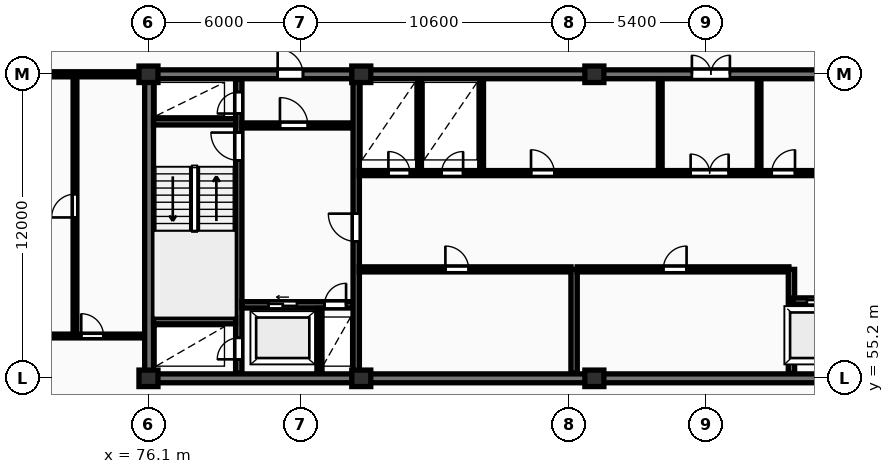
"""IFC4 building model, lengths in metres.
Left out: names, types, materials, properties, quantities, classifications, styles, units other than length and angle.
Written with IfcOpenShell. Run it as: python <this file> out.ifc"""

import sys

from ifc_helpers import new_model, si_unit, direction, frame, frame_2d, origin, origin_2d, place, context, subcontext, project, spatial, rectangle, extrude, element, fill, save


model = new_model("IFC4")
c1 = context("Model", 3, precision=1e-05, world=origin(), true_north=direction((0.0, 1.0)))
c2 = subcontext(c1, "Body", "Model", "MODEL_VIEW")
j1 = project(units=[si_unit("LENGTHUNIT", "METRE"), si_unit("PLANEANGLEUNIT", "RADIAN")], contexts=[c1])
p1 = place(None, origin())
s1 = spatial("IfcSite", under=j1, at=p1, CompositionType="ELEMENT")
p2 = place(p1, origin())
s2 = spatial("IfcBuilding", under=s1, at=p2, CompositionType="ELEMENT")
p3 = place(p2, frame((0.0, 0.0, 249.35)))
s3 = spatial("IfcBuildingStorey", under=s2, at=p3, CompositionType="ELEMENT", Elevation=249.35)
for number, where, z_axis, x_axis in (
    (1, (76.1, 55.2, 0.0), (0.0, 0.0, 1.0), (1.0, 0.0, 0.0)),
    (2, (76.1, 67.2, 0.0), (0.0, 0.0, 1.0), (1.0, 0.0, 0.0)),
    (3, (84.5, 55.2, 0.0), (0.0, 0.0, 1.0), (1.0, 0.0, 0.0)),
    (4, (84.5, 67.2, 0.0), (0.0, 0.0, 1.0), (1.0, 0.0, 0.0)),
    (5, (93.7, 55.2, 0.0), (0.0, 0.0, 1.0), (1.0, 0.0, 0.0)),
    (6, (93.7, 67.2, 0.0), (0.0, 0.0, 1.0), (1.0, 0.0, 0.0)),
):
    element("IfcColumn", number, at=place(p3, frame(where, z_axis=z_axis, x_axis=x_axis)), inside=s3, PredefinedType="COLUMN", context=c2, shape_type="SweptSolid", body=[
        extrude(rectangle(XDim=0.75, YDim=0.65, at=origin_2d()), origin(), (0.0, 0.0, 1.0), 3.45),
    ])
p4 = place(p3, frame((75.95, 55.2, 0.0), z_axis=(0.0, 0.0, 1.0), x_axis=(1.0, 0.0, 0.0)))
e7 = element("IfcWall", 7, at=p4, inside=s3, PredefinedType="SHEAR", context=c2, shape_type="SweptSolid", body=[
    extrude(rectangle(XDim=36.3, YDim=0.35, at=frame_2d((18.15, 0.0))), origin(), (0.0, 0.0, 1.0), 3.45),
])
p5 = place(p3, frame((76.125, 55.375, 0.0), z_axis=(0.0, 0.0, 1.0), x_axis=(0.0, 1.0, 0.0)))
e8 = element("IfcWall", 8, at=p5, inside=s3, PredefinedType="SHEAR", context=c2, shape_type="SweptSolid", body=[
    extrude(rectangle(XDim=11.65, YDim=0.35, at=frame_2d((5.825, 0.0))), origin(), (0.0, 0.0, 1.0), 3.45),
])
p6 = place(p3, frame((75.95, 67.2, 0.0), z_axis=(0.0, 0.0, 1.0), x_axis=(1.0, 0.0, 0.0)))
e9 = element("IfcWall", 9, at=p6, inside=s3, PredefinedType="SHEAR", context=c2, shape_type="SweptSolid", body=[
    extrude(rectangle(XDim=36.3, YDim=0.35, at=frame_2d((18.15, 0.0))), origin(), (0.0, 0.0, 1.0), 3.45),
])
p7 = place(p6, frame((5.25, 0.0, 0.0)))
e10 = element("IfcOpeningElement", 10, at=p7, cuts=e9, PredefinedType="OPENING", context=c2, shape_type="SweptSolid", body=[
    extrude(rectangle(XDim=1.0, YDim=2.15, at=frame_2d((0.5, 1.075))), frame((0.0, 0.185, 0.0), z_axis=(0.0, -1.0, 0.0), x_axis=(1.0, 0.0, 0.0)), (0.0, 0.0, 1.0), 0.37),
])
p8 = place(p6, frame((21.6, 0.0, 0.0)))
e11 = element("IfcOpeningElement", 11, at=p8, cuts=e9, PredefinedType="OPENING", context=c2, shape_type="SweptSolid", body=[
    extrude(rectangle(XDim=1.5, YDim=2.2, at=frame_2d((0.75, 1.1))), frame((0.0, 0.185, 0.0), z_axis=(0.0, -1.0, 0.0), x_axis=(1.0, 0.0, 0.0)), (0.0, 0.0, 1.0), 0.37),
])
p9 = place(p6, frame((30.45, 0.0, 0.0)))
e12 = element("IfcOpeningElement", 12, at=p9, cuts=e9, PredefinedType="OPENING", context=c2, shape_type="SweptSolid", body=[
    extrude(rectangle(XDim=1.0, YDim=2.15, at=frame_2d((0.5, 1.075))), frame((0.0, 0.185, 0.0), z_axis=(0.0, -1.0, 0.0), x_axis=(1.0, 0.0, 0.0)), (0.0, 0.0, 1.0), 0.37),
])
p10 = place(p3, frame((79.665, 55.4, 0.0), z_axis=(0.0, 0.0, 1.0), x_axis=(0.0, 1.0, 0.0)))
e13 = element("IfcWall", 13, at=p10, inside=s3, PredefinedType="SHEAR", context=c2, shape_type="SweptSolid", body=[
    extrude(rectangle(XDim=11.6, YDim=0.25, at=frame_2d((5.8, 0.0))), origin(), (0.0, 0.0, 1.0), 3.45),
])
p11 = place(p10, frame((0.55, 0.0, 0.0)))
e14 = element("IfcOpeningElement", 14, at=p11, cuts=e13, PredefinedType="OPENING", context=c2, shape_type="SweptSolid", body=[
    extrude(rectangle(XDim=0.85, YDim=2.05, at=frame_2d((0.425, 1.025))), frame((0.0, 0.135, 0.0), z_axis=(0.0, -1.0, 0.0), x_axis=(1.0, 0.0, 0.0)), (0.0, 0.0, 1.0), 0.27),
])
p12 = place(p10, frame((8.4, 0.0, 0.0)))
e15 = element("IfcOpeningElement", 15, at=p12, cuts=e13, PredefinedType="OPENING", context=c2, shape_type="SweptSolid", body=[
    extrude(rectangle(XDim=1.1, YDim=2.1, at=frame_2d((0.55, 1.05))), frame((0.0, 0.135, 0.0), z_axis=(0.0, -1.0, 0.0), x_axis=(1.0, 0.0, 0.0)), (0.0, 0.0, 1.0), 0.27),
])
p13 = place(p10, frame((10.25, 0.0, 0.0)))
e16 = element("IfcOpeningElement", 16, at=p13, cuts=e13, PredefinedType="OPENING", context=c2, shape_type="SweptSolid", body=[
    extrude(rectangle(XDim=0.85, YDim=2.05, at=frame_2d((0.425, 1.025))), frame((0.0, 0.135, 0.0), z_axis=(0.0, -1.0, 0.0), x_axis=(1.0, 0.0, 0.0)), (0.0, 0.0, 1.0), 0.27),
])
for number, where, z_axis, x_axis in (
    (17, (76.3, 57.475, 0.0), (0.0, 0.0, 1.0), (1.0, 0.0, 0.0)),
    (18, (76.3, 65.325, 0.0), (0.0, 0.0, 1.0), (1.0, 0.0, 0.0)),
):
    element("IfcWall", number, at=place(p3, frame(where, z_axis=z_axis, x_axis=x_axis)), inside=s3, PredefinedType="SHEAR", context=c2, shape_type="SweptSolid", body=[
        extrude(rectangle(XDim=3.24, YDim=0.25, at=frame_2d((1.62, 0.0))), origin(), (0.0, 0.0, 1.0), 3.45),
    ])
p14 = place(p3, frame((79.79, 58.1, 0.0), z_axis=(0.0, 0.0, 1.0), x_axis=(1.0, 0.0, 0.0)))
e19 = element("IfcWall", 19, at=p14, inside=s3, PredefinedType="SHEAR", context=c2, shape_type="SweptSolid", body=[
    extrude(rectangle(XDim=4.39, YDim=0.25, at=frame_2d((2.195, 0.0))), origin(), (0.0, 0.0, 1.0), 3.45),
])
p15 = place(p14, frame((1.05, 0.0, 0.0)))
e20 = element("IfcOpeningElement", 20, at=p15, cuts=e19, PredefinedType="OPENING", context=c2, shape_type="SweptSolid", body=[
    extrude(rectangle(XDim=1.12, YDim=2.12, at=frame_2d((0.56, 1.06))), frame((0.0, 0.135, 0.0), z_axis=(0.0, -1.0, 0.0), x_axis=(1.0, 0.0, 0.0)), (0.0, 0.0, 1.0), 0.27),
])
p16 = place(p14, frame((3.26, 0.0, 0.0)))
e21 = element("IfcOpeningElement", 21, at=p16, cuts=e19, PredefinedType="OPENING", context=c2, shape_type="SweptSolid", body=[
    extrude(rectangle(XDim=0.85, YDim=2.05, at=frame_2d((0.425, 1.025))), frame((0.0, 0.135, 0.0), z_axis=(0.0, -1.0, 0.0), x_axis=(1.0, 0.0, 0.0)), (0.0, 0.0, 1.0), 0.27),
])
p17 = place(p3, frame((82.85, 55.4, 0.0), z_axis=(0.0, 0.0, 1.0), x_axis=(0.0, 1.0, 0.0)))
e22 = element("IfcWall", 22, at=p17, inside=s3, PredefinedType="PARTITIONING", context=c2, shape_type="SweptSolid", body=[
    extrude(rectangle(XDim=2.56, YDim=0.2, at=frame_2d((1.28, 0.0))), origin(), (0.0, 0.0, 1.0), 3.17),
])
p18 = place(p3, frame((79.79, 65.18, 0.0), z_axis=(0.0, 0.0, 1.0), x_axis=(1.0, 0.0, 0.0)))
e23 = element("IfcWall", 23, at=p18, inside=s3, PredefinedType="PARTITIONING", context=c2, shape_type="SweptSolid", body=[
    extrude(rectangle(XDim=4.39, YDim=0.2, at=frame_2d((2.195, 0.0))), origin(), (0.0, 0.0, 1.0), 3.17),
])
p19 = place(p18, frame((1.5, 0.0, 0.0)))
e24 = element("IfcOpeningElement", 24, at=p19, cuts=e23, PredefinedType="OPENING", context=c2, shape_type="SweptSolid", body=[
    extrude(rectangle(XDim=1.1, YDim=2.1, at=frame_2d((0.55, 1.05))), frame((0.0, 0.11, 0.0), z_axis=(0.0, -1.0, 0.0), x_axis=(1.0, 0.0, 0.0)), (0.0, 0.0, 1.0), 0.22),
])
p20 = place(p3, frame((84.3, 55.4, 0.0), z_axis=(0.0, 0.0, 1.0), x_axis=(0.0, 1.0, 0.0)))
e25 = element("IfcWall", 25, at=p20, inside=s3, PredefinedType="SHEAR", context=c2, shape_type="SweptSolid", body=[
    extrude(rectangle(XDim=11.6, YDim=0.25, at=frame_2d((5.8, 0.0))), origin(), (0.0, 0.0, 1.0), 3.45),
])
p21 = place(p20, frame((5.2, 0.0, 0.0)))
e26 = element("IfcOpeningElement", 26, at=p21, cuts=e25, PredefinedType="OPENING", context=c2, shape_type="SweptSolid", body=[
    extrude(rectangle(XDim=1.1, YDim=2.1, at=frame_2d((0.55, 1.05))), frame((0.0, 0.135, 0.0), z_axis=(0.0, -1.0, 0.0), x_axis=(1.0, 0.0, 0.0)), (0.0, 0.0, 1.0), 0.27),
])
p22 = place(p3, frame((84.42, 59.5, 0.0), z_axis=(0.0, 0.0, 1.0), x_axis=(1.0, 0.0, 0.0)))
e27 = element("IfcWall", 27, at=p22, inside=s3, PredefinedType="PARTITIONING", context=c2, shape_type="SweptSolid", body=[
    extrude(rectangle(XDim=8.36, YDim=0.2, at=frame_2d((4.18, 0.0))), origin(), (0.0, 0.0, 1.0), 3.17),
])
p23 = place(p22, frame((3.4, 0.0, 0.0)))
e28 = element("IfcOpeningElement", 28, at=p23, cuts=e27, PredefinedType="OPENING", context=c2, shape_type="SweptSolid", body=[
    extrude(rectangle(XDim=0.92, YDim=2.08, at=frame_2d((0.46, 1.04))), frame((0.0, 0.11, 0.0), z_axis=(0.0, -1.0, 0.0), x_axis=(1.0, 0.0, 0.0)), (0.0, 0.0, 1.0), 0.22),
])
p24 = place(p3, frame((92.9, 55.4, 0.0), z_axis=(0.0, 0.0, 1.0), x_axis=(0.0, 1.0, 0.0)))
e29 = element("IfcWall", 29, at=p24, inside=s3, PredefinedType="SHEAR", context=c2, shape_type="SweptSolid", body=[
    extrude(rectangle(XDim=4.1, YDim=0.25, at=frame_2d((2.05, 0.0))), origin(), (0.0, 0.0, 1.0), 3.45),
])
p25 = place(p3, frame((93.02, 59.5, 0.0), z_axis=(0.0, 0.0, 1.0), x_axis=(1.0, 0.0, 0.0)))
e30 = element("IfcWall", 30, at=p25, inside=s3, PredefinedType="PARTITIONING", context=c2, shape_type="SweptSolid", body=[
    extrude(rectangle(XDim=8.36, YDim=0.2, at=frame_2d((4.18, 0.0))), origin(), (0.0, 0.0, 1.0), 3.17),
])
p26 = place(p25, frame((3.4, 0.0, 0.0)))
e31 = element("IfcOpeningElement", 31, at=p26, cuts=e30, PredefinedType="OPENING", context=c2, shape_type="SweptSolid", body=[
    extrude(rectangle(XDim=0.92, YDim=2.08, at=frame_2d((0.46, 1.04))), frame((0.0, 0.11, 0.0), z_axis=(0.0, -1.0, 0.0), x_axis=(1.0, 0.0, 0.0)), (0.0, 0.0, 1.0), 0.22),
])
p27 = place(p3, frame((101.48, 55.4, 0.0), z_axis=(0.0, 0.0, 1.0), x_axis=(0.0, 1.0, 0.0)))
e32 = element("IfcWall", 32, at=p27, inside=s3, PredefinedType="SHEAR", context=c2, shape_type="SweptSolid", body=[
    extrude(rectangle(XDim=4.1, YDim=0.25, at=frame_2d((2.05, 0.0))), origin(), (0.0, 0.0, 1.0), 3.45),
])
p28 = place(p3, frame((101.55, 58.25, 0.0), z_axis=(0.0, 0.0, 1.0), x_axis=(1.0, 0.0, 0.0)))
e33 = element("IfcWall", 33, at=p28, inside=s3, PredefinedType="SHEAR", context=c2, shape_type="SweptSolid", body=[
    extrude(rectangle(XDim=4.6, YDim=0.25, at=frame_2d((2.3, 0.0))), origin(), (0.0, 0.0, 1.0), 3.45),
])
p29 = place(p28, frame((0.54, 0.0, 0.0)))
e34 = element("IfcOpeningElement", 34, at=p29, cuts=e33, PredefinedType="OPENING", context=c2, shape_type="SweptSolid", body=[
    extrude(rectangle(XDim=1.12, YDim=2.12, at=frame_2d((0.56, 1.06))), frame((0.0, 0.135, 0.0), z_axis=(0.0, -1.0, 0.0), x_axis=(1.0, 0.0, 0.0)), (0.0, 0.0, 1.0), 0.27),
])
p30 = place(p28, frame((2.94, 0.0, 0.0)))
e35 = element("IfcOpeningElement", 35, at=p30, cuts=e33, PredefinedType="OPENING", context=c2, shape_type="SweptSolid", body=[
    extrude(rectangle(XDim=1.12, YDim=2.12, at=frame_2d((0.56, 1.06))), frame((0.0, 0.135, 0.0), z_axis=(0.0, -1.0, 0.0), x_axis=(1.0, 0.0, 0.0)), (0.0, 0.0, 1.0), 0.27),
])
for number, where, z_axis, x_axis in (
    (36, (86.8, 63.4, 0.0), (0.0, 0.0, 1.0), (0.0, 1.0, 0.0)),
    (37, (89.25, 63.4, 0.0), (0.0, 0.0, 1.0), (0.0, 1.0, 0.0)),
    (38, (96.3, 63.4, 0.0), (0.0, 0.0, 1.0), (0.0, 1.0, 0.0)),
    (39, (100.2, 63.4, 0.0), (0.0, 0.0, 1.0), (0.0, 1.0, 0.0)),
):
    element("IfcWall", number, at=place(p3, frame(where, z_axis=z_axis, x_axis=x_axis)), inside=s3, PredefinedType="PARTITIONING", context=c2, shape_type="SweptSolid", body=[
        extrude(rectangle(XDim=3.6, YDim=0.15, at=frame_2d((1.8, 0.0))), origin(), (0.0, 0.0, 1.0), 3.17),
    ])
p31 = place(p3, frame((84.42, 63.3, 0.0), z_axis=(0.0, 0.0, 1.0), x_axis=(1.0, 0.0, 0.0)))
e40 = element("IfcWall", 40, at=p31, inside=s3, PredefinedType="PARTITIONING", context=c2, shape_type="SweptSolid", body=[
    extrude(rectangle(XDim=19.83, YDim=0.2, at=frame_2d((9.915, 0.0))), origin(), (0.0, 0.0, 1.0), 3.17),
])
p32 = place(p31, frame((1.15, 0.0, 0.0)))
e41 = element("IfcOpeningElement", 41, at=p32, cuts=e40, PredefinedType="OPENING", context=c2, shape_type="SweptSolid", body=[
    extrude(rectangle(XDim=0.85, YDim=2.05, at=frame_2d((0.425, 1.025))), frame((0.0, 0.11, 0.0), z_axis=(0.0, -1.0, 0.0), x_axis=(1.0, 0.0, 0.0)), (0.0, 0.0, 1.0), 0.22),
])
p33 = place(p31, frame((3.25, 0.0, 0.0)))
e42 = element("IfcOpeningElement", 42, at=p33, cuts=e40, PredefinedType="OPENING", context=c2, shape_type="SweptSolid", body=[
    extrude(rectangle(XDim=0.85, YDim=2.05, at=frame_2d((0.425, 1.025))), frame((0.0, 0.11, 0.0), z_axis=(0.0, -1.0, 0.0), x_axis=(1.0, 0.0, 0.0)), (0.0, 0.0, 1.0), 0.22),
])
p34 = place(p31, frame((13.08, 0.0, 0.0)))
e43 = element("IfcOpeningElement", 43, at=p34, cuts=e40, PredefinedType="OPENING", context=c2, shape_type="SweptSolid", body=[
    extrude(rectangle(XDim=1.5, YDim=2.2, at=frame_2d((0.75, 1.1))), frame((0.0, 0.11, 0.0), z_axis=(0.0, -1.0, 0.0), x_axis=(1.0, 0.0, 0.0)), (0.0, 0.0, 1.0), 0.22),
])
p35 = place(p31, frame((6.78, 0.0, 0.0)))
e44 = element("IfcOpeningElement", 44, at=p35, cuts=e40, PredefinedType="OPENING", context=c2, shape_type="SweptSolid", body=[
    extrude(rectangle(XDim=0.92, YDim=2.08, at=frame_2d((0.46, 1.04))), frame((0.0, 0.11, 0.0), z_axis=(0.0, -1.0, 0.0), x_axis=(1.0, 0.0, 0.0)), (0.0, 0.0, 1.0), 0.22),
])
p36 = place(p31, frame((16.28, 0.0, 0.0)))
e45 = element("IfcOpeningElement", 45, at=p36, cuts=e40, PredefinedType="OPENING", context=c2, shape_type="SweptSolid", body=[
    extrude(rectangle(XDim=0.92, YDim=2.08, at=frame_2d((0.46, 1.04))), frame((0.0, 0.11, 0.0), z_axis=(0.0, -1.0, 0.0), x_axis=(1.0, 0.0, 0.0)), (0.0, 0.0, 1.0), 0.22),
])
p37 = place(p3, frame((73.2, 56.87, 0.0), z_axis=(0.0, 0.0, 1.0), x_axis=(0.0, 1.0, 0.0)))
e46 = element("IfcWall", 46, at=p37, inside=s3, PredefinedType="PARTITIONING", context=c2, shape_type="SweptSolid", body=[
    extrude(rectangle(XDim=10.28, YDim=0.15, at=frame_2d((5.14, 0.0))), origin(), (0.0, 0.0, 1.0), 3.17),
])
p38 = place(p37, frame((4.68, 0.0, 0.0)))
e47 = element("IfcOpeningElement", 47, at=p38, cuts=e46, PredefinedType="OPENING", context=c2, shape_type="SweptSolid", body=[
    extrude(rectangle(XDim=0.92, YDim=2.08, at=frame_2d((0.46, 1.04))), frame((0.0, 0.085, 0.0), z_axis=(0.0, -1.0, 0.0), x_axis=(1.0, 0.0, 0.0)), (0.0, 0.0, 1.0), 0.17),
])
p39 = place(p3, frame((69.17, 56.87, 0.0), z_axis=(0.0, 0.0, 1.0), x_axis=(1.0, 0.0, 0.0)))
e48 = element("IfcWall", 48, at=p39, inside=s3, PredefinedType="PARTITIONING", context=c2, shape_type="SweptSolid", body=[
    extrude(rectangle(XDim=6.76, YDim=0.15, at=frame_2d((3.38, 0.0))), origin(), (0.0, 0.0, 1.0), 3.17),
])
p40 = place(p39, frame((1.362, 0.0, 0.0)))
e49 = element("IfcOpeningElement", 49, at=p40, cuts=e48, PredefinedType="OPENING", context=c2, shape_type="SweptSolid", body=[
    extrude(rectangle(XDim=0.84, YDim=2.04, at=frame_2d((0.42, 1.02))), frame((0.0, 0.085, 0.0), z_axis=(0.0, -1.0, 0.0), x_axis=(1.0, 0.0, 0.0)), (0.0, 0.0, 1.0), 0.17),
])
p41 = place(p39, frame((4.277, 0.0, 0.0)))
e50 = element("IfcOpeningElement", 50, at=p41, cuts=e48, PredefinedType="OPENING", context=c2, shape_type="SweptSolid", body=[
    extrude(rectangle(XDim=0.88, YDim=2.06, at=frame_2d((0.44, 1.03))), frame((0.0, 0.085, 0.0), z_axis=(0.0, -1.0, 0.0), x_axis=(1.0, 0.0, 0.0)), (0.0, 0.0, 1.0), 0.17),
])
p42 = place(p3, frame((59.8, 67.2, 0.0), z_axis=(0.0, 0.0, 1.0), x_axis=(1.0, 0.0, 0.0)))
e51 = element("IfcWall", 51, at=p42, inside=s3, PredefinedType="PARTITIONING", context=c2, shape_type="SweptSolid", body=[
    extrude(rectangle(XDim=16.15, YDim=0.2, at=frame_2d((8.075, 0.0))), origin(), (0.0, 0.0, 1.0), 2.633),
])
p43 = place(p42, frame((9.772, 0.0, 0.0)))
e52 = element("IfcOpeningElement", 52, at=p43, cuts=e51, PredefinedType="OPENING", context=c2, shape_type="SweptSolid", body=[
    extrude(rectangle(XDim=0.95, YDim=2.15, at=frame_2d((0.475, 1.075))), frame((0.0, 0.11, 0.0), z_axis=(0.0, -1.0, 0.0), x_axis=(1.0, 0.0, 0.0)), (0.0, 0.0, 1.0), 0.22),
])
p44 = place(p7, origin())
e53 = element("IfcDoor", 53, at=p44, inside=s3, OperationType="SINGLE_SWING_LEFT", PredefinedType="DOOR", context=c2, shape_type="SweptSolid", body=[
    extrude(rectangle(XDim=1.0, YDim=2.15, at=frame_2d((0.5, 1.075))), frame((0.0, 0.025, 0.0), z_axis=(0.0, -1.0, 0.0), x_axis=(1.0, 0.0, 0.0)), (0.0, 0.0, 1.0), 0.05),
])
fill(e10, e53)
p45 = place(p8, origin())
e54 = element("IfcDoor", 54, at=p45, inside=s3, OperationType="DOUBLE_DOOR_SINGLE_SWING", PredefinedType="DOOR", context=c2, shape_type="SweptSolid", body=[
    extrude(rectangle(XDim=1.5, YDim=2.2, at=frame_2d((0.75, 1.1))), frame((0.0, 0.025, 0.0), z_axis=(0.0, -1.0, 0.0), x_axis=(1.0, 0.0, 0.0)), (0.0, 0.0, 1.0), 0.05),
])
fill(e11, e54)
p46 = place(p11, origin())
e55 = element("IfcDoor", 55, at=p46, inside=s3, OperationType="SINGLE_SWING_LEFT", PredefinedType="DOOR", context=c2, shape_type="SweptSolid", body=[
    extrude(rectangle(XDim=0.85, YDim=2.05, at=frame_2d((0.425, 1.025))), frame((0.0, 0.025, 0.0), z_axis=(0.0, -1.0, 0.0), x_axis=(1.0, 0.0, 0.0)), (0.0, 0.0, 1.0), 0.05),
])
fill(e14, e55)
p47 = place(p12, origin())
e56 = element("IfcDoor", 56, at=p47, inside=s3, OperationType="SINGLE_SWING_RIGHT", PredefinedType="DOOR", context=c2, shape_type="SweptSolid", body=[
    extrude(rectangle(XDim=1.1, YDim=2.1, at=frame_2d((0.55, 1.05))), frame((0.0, 0.025, 0.0), z_axis=(0.0, -1.0, 0.0), x_axis=(1.0, 0.0, 0.0)), (0.0, 0.0, 1.0), 0.05),
])
fill(e15, e56)
p48 = place(p13, origin())
e57 = element("IfcDoor", 57, at=p48, inside=s3, OperationType="SINGLE_SWING_LEFT", PredefinedType="DOOR", context=c2, shape_type="SweptSolid", body=[
    extrude(rectangle(XDim=0.85, YDim=2.05, at=frame_2d((0.425, 1.025))), frame((0.0, 0.025, 0.0), z_axis=(0.0, -1.0, 0.0), x_axis=(1.0, 0.0, 0.0)), (0.0, 0.0, 1.0), 0.05),
])
fill(e16, e57)
p49 = place(p15, origin())
e58 = element("IfcDoor", 58, at=p49, inside=s3, OperationType="SLIDING_TO_LEFT", PredefinedType="DOOR", context=c2, shape_type="SweptSolid", body=[
    extrude(rectangle(XDim=1.12, YDim=2.12, at=frame_2d((0.56, 1.06))), frame((0.0, 0.025, 0.0), z_axis=(0.0, -1.0, 0.0), x_axis=(1.0, 0.0, 0.0)), (0.0, 0.0, 1.0), 0.05),
])
fill(e20, e58)
p50 = place(p16, origin())
e59 = element("IfcDoor", 59, at=p50, inside=s3, OperationType="SINGLE_SWING_RIGHT", PredefinedType="DOOR", context=c2, shape_type="SweptSolid", body=[
    extrude(rectangle(XDim=0.85, YDim=2.05, at=frame_2d((0.425, 1.025))), frame((0.0, 0.025, 0.0), z_axis=(0.0, -1.0, 0.0), x_axis=(1.0, 0.0, 0.0)), (0.0, 0.0, 1.0), 0.05),
])
fill(e21, e59)
p51 = place(p19, origin())
e60 = element("IfcDoor", 60, at=p51, inside=s3, OperationType="SINGLE_SWING_LEFT", PredefinedType="DOOR", context=c2, shape_type="SweptSolid", body=[
    extrude(rectangle(XDim=1.1, YDim=2.1, at=frame_2d((0.55, 1.05))), frame((0.0, 0.025, 0.0), z_axis=(0.0, -1.0, 0.0), x_axis=(1.0, 0.0, 0.0)), (0.0, 0.0, 1.0), 0.05),
])
fill(e24, e60)
p52 = place(p21, origin())
e61 = element("IfcDoor", 61, at=p52, inside=s3, OperationType="SINGLE_SWING_RIGHT", PredefinedType="DOOR", context=c2, shape_type="SweptSolid", body=[
    extrude(rectangle(XDim=1.1, YDim=2.1, at=frame_2d((0.55, 1.05))), frame((0.0, 0.025, 0.0), z_axis=(0.0, -1.0, 0.0), x_axis=(1.0, 0.0, 0.0)), (0.0, 0.0, 1.0), 0.05),
])
fill(e26, e61)
p53 = place(p23, origin())
e62 = element("IfcDoor", 62, at=p53, inside=s3, OperationType="SINGLE_SWING_LEFT", PredefinedType="DOOR", context=c2, shape_type="SweptSolid", body=[
    extrude(rectangle(XDim=0.92, YDim=2.08, at=frame_2d((0.46, 1.04))), frame((0.0, 0.025, 0.0), z_axis=(0.0, -1.0, 0.0), x_axis=(1.0, 0.0, 0.0)), (0.0, 0.0, 1.0), 0.05),
])
fill(e28, e62)
p54 = place(p26, origin())
e63 = element("IfcDoor", 63, at=p54, inside=s3, OperationType="SINGLE_SWING_RIGHT", PredefinedType="DOOR", context=c2, shape_type="SweptSolid", body=[
    extrude(rectangle(XDim=0.92, YDim=2.08, at=frame_2d((0.46, 1.04))), frame((0.0, 0.025, 0.0), z_axis=(0.0, -1.0, 0.0), x_axis=(1.0, 0.0, 0.0)), (0.0, 0.0, 1.0), 0.05),
])
fill(e31, e63)
p55 = place(p29, origin())
e64 = element("IfcDoor", 64, at=p55, inside=s3, OperationType="SLIDING_TO_LEFT", PredefinedType="DOOR", context=c2, shape_type="SweptSolid", body=[
    extrude(rectangle(XDim=1.12, YDim=2.12, at=frame_2d((0.56, 1.06))), frame((0.0, 0.025, 0.0), z_axis=(0.0, -1.0, 0.0), x_axis=(1.0, 0.0, 0.0)), (0.0, 0.0, 1.0), 0.05),
])
fill(e34, e64)
p56 = place(p32, origin())
e65 = element("IfcDoor", 65, at=p56, inside=s3, OperationType="SINGLE_SWING_LEFT", PredefinedType="DOOR", context=c2, shape_type="SweptSolid", body=[
    extrude(rectangle(XDim=0.85, YDim=2.05, at=frame_2d((0.425, 1.025))), frame((0.0, 0.025, 0.0), z_axis=(0.0, -1.0, 0.0), x_axis=(1.0, 0.0, 0.0)), (0.0, 0.0, 1.0), 0.05),
])
fill(e41, e65)
p57 = place(p33, origin())
e66 = element("IfcDoor", 66, at=p57, inside=s3, OperationType="SINGLE_SWING_RIGHT", PredefinedType="DOOR", context=c2, shape_type="SweptSolid", body=[
    extrude(rectangle(XDim=0.85, YDim=2.05, at=frame_2d((0.425, 1.025))), frame((0.0, 0.025, 0.0), z_axis=(0.0, -1.0, 0.0), x_axis=(1.0, 0.0, 0.0)), (0.0, 0.0, 1.0), 0.05),
])
fill(e42, e66)
p58 = place(p34, origin())
e67 = element("IfcDoor", 67, at=p58, inside=s3, OperationType="DOUBLE_DOOR_SINGLE_SWING", PredefinedType="DOOR", context=c2, shape_type="SweptSolid", body=[
    extrude(rectangle(XDim=1.5, YDim=2.2, at=frame_2d((0.75, 1.1))), frame((0.0, 0.025, 0.0), z_axis=(0.0, -1.0, 0.0), x_axis=(1.0, 0.0, 0.0)), (0.0, 0.0, 1.0), 0.05),
])
fill(e43, e67)
p59 = place(p35, origin())
e68 = element("IfcDoor", 68, at=p59, inside=s3, OperationType="SINGLE_SWING_LEFT", PredefinedType="DOOR", context=c2, shape_type="SweptSolid", body=[
    extrude(rectangle(XDim=0.92, YDim=2.08, at=frame_2d((0.46, 1.04))), frame((0.0, 0.025, 0.0), z_axis=(0.0, -1.0, 0.0), x_axis=(1.0, 0.0, 0.0)), (0.0, 0.0, 1.0), 0.05),
])
fill(e44, e68)
p60 = place(p36, origin())
e69 = element("IfcDoor", 69, at=p60, inside=s3, OperationType="SINGLE_SWING_RIGHT", PredefinedType="DOOR", context=c2, shape_type="SweptSolid", body=[
    extrude(rectangle(XDim=0.92, YDim=2.08, at=frame_2d((0.46, 1.04))), frame((0.0, 0.025, 0.0), z_axis=(0.0, -1.0, 0.0), x_axis=(1.0, 0.0, 0.0)), (0.0, 0.0, 1.0), 0.05),
])
fill(e45, e69)
p61 = place(p38, origin())
e70 = element("IfcDoor", 70, at=p61, inside=s3, OperationType="SINGLE_SWING_LEFT", PredefinedType="DOOR", context=c2, shape_type="SweptSolid", body=[
    extrude(rectangle(XDim=0.92, YDim=2.08, at=frame_2d((0.46, 1.04))), frame((0.0, 0.025, 0.0), z_axis=(0.0, -1.0, 0.0), x_axis=(1.0, 0.0, 0.0)), (0.0, 0.0, 1.0), 0.05),
])
fill(e47, e70)
p62 = place(p41, origin())
e71 = element("IfcDoor", 71, at=p62, inside=s3, OperationType="SINGLE_SWING_LEFT", PredefinedType="DOOR", context=c2, shape_type="SweptSolid", body=[
    extrude(rectangle(XDim=0.88, YDim=2.06, at=frame_2d((0.44, 1.03))), frame((0.0, 0.025, 0.0), z_axis=(0.0, -1.0, 0.0), x_axis=(1.0, 0.0, 0.0)), (0.0, 0.0, 1.0), 0.05),
])
fill(e50, e71)
save(model, sys.argv[1])
